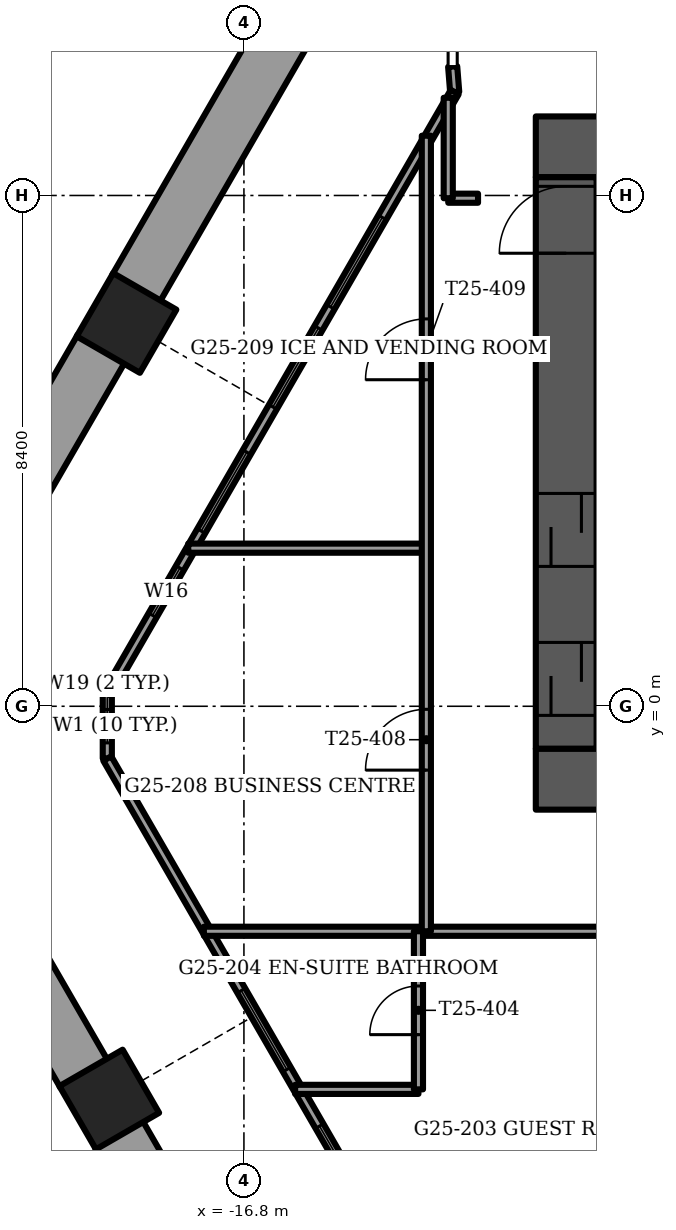
"""IFC4 building model, lengths in metres.
Left out: names, types, materials, properties, quantities, classifications, styles, units other than length and angle.
Written with IfcOpenShell. Run it as: python <this file> out.ifc"""

import sys

from ifc_helpers import new_model, si_unit, direction, frame, frame_2d, origin, origin_2d, place, context, subcontext, project, spatial, rectangle, extrude, element, fill, save


model = new_model("IFC4")
c1 = context("Model", 3, precision=1e-05, world=origin(), true_north=direction((0.0, 1.0)))
c2 = subcontext(c1, "Body", "Model", "MODEL_VIEW")
j1 = project(units=[si_unit("LENGTHUNIT", "METRE"), si_unit("PLANEANGLEUNIT", "RADIAN")], contexts=[c1])
p1 = place(None, origin())
s1 = spatial("IfcSite", under=j1, at=p1, CompositionType="ELEMENT")
p2 = place(p1, origin())
s2 = spatial("IfcBuilding", under=s1, at=p2, CompositionType="ELEMENT")
p3 = place(p2, frame((0.0, 0.0, 100.5)))
s3 = spatial("IfcBuildingStorey", under=s2, at=p3, CompositionType="ELEMENT", Elevation=100.5)
for number, where, z_axis, x_axis in (
    (1, (-18.731, 6.303, -1.2), (0.0, 0.0, 1.0), (0.5, 0.866, 0.0)),
    (2, (-19.014, -6.467, -1.2), (0.0, 0.0, 1.0), (-0.5, 0.866, 0.0)),
):
    element("IfcColumn", number, at=place(p3, frame(where, z_axis=z_axis, x_axis=x_axis)), inside=s3, PredefinedType="COLUMN", context=c2, shape_type="SweptSolid", body=[
        extrude(rectangle(XDim=1.2, YDim=1.2, at=origin_2d()), origin(), (0.0, 0.0, 1.0), 3.75),
    ])
p4 = place(p3, frame((-12.0, -1.2, -0.3), z_axis=(0.0, 0.0, 1.0), x_axis=(1.0, 0.0, 0.0)))
e3 = element("IfcWall", 3, at=p4, inside=s3, PredefinedType="SHEAR", context=c2, shape_type="SweptSolid", body=[
    extrude(rectangle(XDim=24.0, YDim=1.0, at=frame_2d((12.0, 0.0))), origin(), (0.0, 0.0, 1.0), 3.75),
])
p5 = place(p4, frame((11.2, 0.0, 0.0)))
e4 = element("IfcOpeningElement", 4, at=p5, cuts=e3, PredefinedType="OPENING", context=c2, shape_type="SweptSolid", body=[
    extrude(rectangle(XDim=1.6, YDim=2.1, at=frame_2d((0.8, 1.05))), frame((0.0, 0.5, 0.0), z_axis=(0.0, -1.0, 0.0), x_axis=(1.0, 0.0, 0.0)), (0.0, 0.0, 1.0), 1.0),
])
p6 = place(p3, frame((-12.0, 9.2, -0.3), z_axis=(0.0, 0.0, 1.0), x_axis=(1.0, 0.0, 0.0)))
e5 = element("IfcWall", 5, at=p6, inside=s3, PredefinedType="SHEAR", context=c2, shape_type="SweptSolid", body=[
    extrude(rectangle(XDim=24.0, YDim=1.0, at=frame_2d((12.0, 0.0))), origin(), (0.0, 0.0, 1.0), 3.75),
])
p7 = place(p6, frame((11.2, 0.0, 0.0)))
e6 = element("IfcOpeningElement", 6, at=p7, cuts=e5, PredefinedType="OPENING", context=c2, shape_type="SweptSolid", body=[
    extrude(rectangle(XDim=1.6, YDim=2.1, at=frame_2d((0.8, 1.05))), frame((0.0, 0.5, 0.0), z_axis=(0.0, -1.0, 0.0), x_axis=(1.0, 0.0, 0.0)), (0.0, 0.0, 1.0), 1.0),
])
p8 = place(p6, frame((5.25, 0.0, 0.0)))
e7 = element("IfcOpeningElement", 7, at=p8, cuts=e5, PredefinedType="OPENING", context=c2, shape_type="SweptSolid", body=[
    extrude(rectangle(XDim=1.1, YDim=2.1, at=frame_2d((0.55, 1.05))), frame((0.0, 0.5, 0.0), z_axis=(0.0, -1.0, 0.0), x_axis=(1.0, 0.0, 0.0)), (0.0, 0.0, 1.0), 1.0),
])
p9 = place(p6, frame((17.65, 0.0, 0.0)))
e8 = element("IfcOpeningElement", 8, at=p9, cuts=e5, PredefinedType="OPENING", context=c2, shape_type="SweptSolid", body=[
    extrude(rectangle(XDim=1.1, YDim=2.1, at=frame_2d((0.55, 1.05))), frame((0.0, 0.5, 0.0), z_axis=(0.0, -1.0, 0.0), x_axis=(1.0, 0.0, 0.0)), (0.0, 0.0, 1.0), 1.0),
])
p10 = place(p3, frame((-11.5, -0.7, -0.3), z_axis=(0.0, 0.0, 1.0), x_axis=(0.0, 1.0, 0.0)))
e9 = element("IfcWall", 9, at=p10, inside=s3, PredefinedType="SHEAR", context=c2, shape_type="SweptSolid", body=[
    extrude(rectangle(XDim=9.4, YDim=1.0, at=frame_2d((4.7, 0.0))), origin(), (0.0, 0.0, 1.0), 3.75),
])
p11 = place(p10, frame((8.15, 0.0, 0.0)))
e10 = element("IfcOpeningElement", 10, at=p11, cuts=e9, PredefinedType="OPENING", context=c2, shape_type="SweptSolid", body=[
    extrude(rectangle(XDim=1.1, YDim=2.1, at=frame_2d((0.55, 1.05))), frame((0.0, 0.5, 0.0), z_axis=(0.0, -1.0, 0.0), x_axis=(1.0, 0.0, 0.0)), (0.0, 0.0, 1.0), 1.0),
])
p12 = place(p10, frame((0.55, 0.0, 0.0)))
e11 = element("IfcOpeningElement", 11, at=p12, cuts=e9, PredefinedType="OPENING", context=c2, shape_type="SweptSolid", body=[
    extrude(rectangle(XDim=1.2, YDim=2.1, at=frame_2d((0.6, 1.05))), frame((0.0, 0.5, 0.0), z_axis=(0.0, -1.0, 0.0), x_axis=(1.0, 0.0, 0.0)), (0.0, 0.0, 1.0), 1.0),
])
p13 = place(p10, frame((3.0, 0.0, 0.0)))
e12 = element("IfcOpeningElement", 12, at=p13, cuts=e9, PredefinedType="OPENING", context=c2, shape_type="SweptSolid", body=[
    extrude(rectangle(XDim=1.2, YDim=2.1, at=frame_2d((0.6, 1.05))), frame((0.0, 0.5, 0.0), z_axis=(0.0, -1.0, 0.0), x_axis=(1.0, 0.0, 0.0)), (0.0, 0.0, 1.0), 1.0),
])
p14 = place(p3, frame((-15.239, 12.651, 0.0), z_axis=(0.0, 0.0, 1.0), x_axis=(-0.499999023957, -0.866025967302, 0.0)))
e13 = element("IfcWall", 13, at=p14, inside=s3, PredefinedType="PARAPET", context=c2, shape_type="SweptSolid", body=[
    extrude(rectangle(XDim=6.673, YDim=0.9, at=frame_2d((3.337, 0.0))), origin(), (0.0, 0.0, 1.0), 1.1),
])
p15 = place(p3, frame((-19.146, 5.885, 0.0), z_axis=(0.0, 0.0, 1.0), x_axis=(-0.500000042739, -0.866025379109, 0.0)))
e14 = element("IfcWall", 14, at=p15, inside=s3, PredefinedType="PARAPET", context=c2, shape_type="SweptSolid", body=[
    extrude(rectangle(XDim=6.522, YDim=0.9, at=frame_2d((3.261, 0.0))), origin(), (0.0, 0.0, 1.0), 1.1),
])
p16 = place(p3, frame((-22.406, -0.891, 0.0), z_axis=(0.0, 0.0, 1.0), x_axis=(0.500001626982, -0.866024464444, 0.0)))
e15 = element("IfcWall", 15, at=p16, inside=s3, PredefinedType="PARAPET", context=c2, shape_type="SweptSolid", body=[
    extrude(rectangle(XDim=5.955, YDim=0.9, at=frame_2d((2.978, 0.0))), origin(), (0.0, 0.0, 1.0), 1.1),
])
p17 = place(p3, frame((-18.859, -7.035, 0.0), z_axis=(0.0, 0.0, 1.0), x_axis=(0.499999023957, -0.866025967302, 0.0)))
e16 = element("IfcWall", 16, at=p17, inside=s3, PredefinedType="PARAPET", context=c2, shape_type="SweptSolid", body=[
    extrude(rectangle(XDim=6.673, YDim=0.9, at=frame_2d((3.337, 0.0))), origin(), (0.0, 0.0, 1.0), 1.1),
])
p18 = place(p3, frame((-13.334, 10.1, 0.0), z_axis=(0.0, 0.0, 1.0), x_axis=(-0.499990645009, -0.866030804823, 0.0)))
e17 = element("IfcWall", 17, at=p18, inside=s3, PredefinedType="SOLIDWALL", context=c2, shape_type="SweptSolid", body=[
    extrude(rectangle(XDim=11.426, YDim=0.15, at=frame_2d((5.713, 0.0))), origin(), (0.0, 0.0, 1.0), 3.45),
])
p19 = place(p18, frame((2.38, 0.0, 0.15)))
e18 = element("IfcOpeningElement", 18, at=p19, cuts=e17, PredefinedType="OPENING", context=c2, shape_type="SweptSolid", body=[
    extrude(rectangle(XDim=1.7, YDim=2.2, at=frame_2d((0.85, 1.1))), frame((0.0, 0.075, 0.0), z_axis=(0.0, -1.0, 0.0), x_axis=(1.0, 0.0, 0.0)), (0.0, 0.0, 1.0), 0.15),
])
p20 = place(p18, frame((4.48, 0.0, 0.15)))
e19 = element("IfcOpeningElement", 19, at=p20, cuts=e17, PredefinedType="OPENING", context=c2, shape_type="SweptSolid", body=[
    extrude(rectangle(XDim=1.5, YDim=2.2, at=frame_2d((0.75, 1.1))), frame((0.0, 0.075, 0.0), z_axis=(0.0, -1.0, 0.0), x_axis=(1.0, 0.0, 0.0)), (0.0, 0.0, 1.0), 0.15),
])
p21 = place(p18, frame((9.037, 0.0, 0.15)))
e20 = element("IfcOpeningElement", 20, at=p21, cuts=e17, PredefinedType="OPENING", context=c2, shape_type="SweptSolid", body=[
    extrude(rectangle(XDim=0.9, YDim=2.2, at=frame_2d((0.45, 1.1))), frame((0.0, 0.075, 0.0), z_axis=(0.0, -1.0, 0.0), x_axis=(1.0, 0.0, 0.0)), (0.0, 0.0, 1.0), 0.15),
])
p22 = place(p18, frame((6.836, 0.0, 0.15)))
e21 = element("IfcOpeningElement", 21, at=p22, cuts=e17, PredefinedType="OPENING", context=c2, shape_type="SweptSolid", body=[
    extrude(rectangle(XDim=1.5, YDim=2.2, at=frame_2d((0.75, 1.1))), frame((0.0, 0.075, 0.0), z_axis=(0.0, -1.0, 0.0), x_axis=(1.0, 0.0, 0.0)), (0.0, 0.0, 1.0), 0.15),
])
p23 = place(p3, frame((-19.047, -0.86, 0.0), z_axis=(0.0, 0.0, 1.0), x_axis=(0.499999897272, -0.866025463095, 0.0)))
e22 = element("IfcWall", 22, at=p23, inside=s3, PredefinedType="SOLIDWALL", context=c2, shape_type="SweptSolid", body=[
    extrude(rectangle(XDim=11.426, YDim=0.15, at=frame_2d((5.713, 0.0))), origin(), (0.0, 0.0, 1.0), 3.45),
])
p24 = place(p23, frame((4.406, 0.0, 0.15)))
e23 = element("IfcOpeningElement", 23, at=p24, cuts=e22, PredefinedType="OPENING", context=c2, shape_type="SweptSolid", body=[
    extrude(rectangle(XDim=1.5, YDim=2.2, at=frame_2d((0.75, 1.1))), frame((0.0, 0.075, 0.0), z_axis=(0.0, -1.0, 0.0), x_axis=(1.0, 0.0, 0.0)), (0.0, 0.0, 1.0), 0.15),
])
p25 = place(p23, frame((6.979, 0.0, 0.15)))
e24 = element("IfcOpeningElement", 24, at=p25, cuts=e22, PredefinedType="OPENING", context=c2, shape_type="SweptSolid", body=[
    extrude(rectangle(XDim=1.7, YDim=2.2, at=frame_2d((0.85, 1.1))), frame((0.0, 0.075, 0.0), z_axis=(0.0, -1.0, 0.0), x_axis=(1.0, 0.0, 0.0)), (0.0, 0.0, 1.0), 0.15),
])
p26 = place(p3, frame((-19.047, 0.205, 0.0), z_axis=(0.0, 0.0, 1.0), x_axis=(0.0, -1.0, 0.0)))
e25 = element("IfcWall", 25, at=p26, inside=s3, PredefinedType="SOLIDWALL", context=c2, shape_type="SweptSolid", body=[
    extrude(rectangle(XDim=1.065, YDim=0.15, at=frame_2d((0.532, 0.0))), origin(), (0.0, 0.0, 1.0), 3.45),
])
p27 = place(p26, frame((0.258, 0.0, 0.15)))
e26 = element("IfcOpeningElement", 26, at=p27, cuts=e25, PredefinedType="OPENING", context=c2, shape_type="SweptSolid", body=[
    extrude(rectangle(XDim=0.55, YDim=2.2, at=frame_2d((0.275, 1.1))), frame((0.0, 0.075, 0.0), z_axis=(0.0, -1.0, 0.0), x_axis=(1.0, 0.0, 0.0)), (0.0, 0.0, 1.0), 0.15),
])
p28 = place(p3, frame((-13.334, 10.1, 0.0), z_axis=(0.0, 0.0, 1.0), x_axis=(-0.078869316502, 0.996884963732, 0.0)))
e27 = element("IfcWall", 27, at=p28, inside=s3, PredefinedType="SOLIDWALL", context=c2, shape_type="SweptSolid", body=[
    extrude(rectangle(XDim=0.421, YDim=0.15, at=frame_2d((0.21, 0.0))), origin(), (0.0, 0.0, 1.0), 3.45),
])
p29 = place(p3, frame((-15.958, -6.3, 0.0), z_axis=(0.0, 0.0, 1.0), x_axis=(1.0, 0.0, 0.0)))
e28 = element("IfcWall", 28, at=p29, inside=s3, PredefinedType="PARTITIONING", context=c2, shape_type="SweptSolid", body=[
    extrude(rectangle(XDim=2.028, YDim=0.15, at=frame_2d((1.014, 0.0))), origin(), (0.0, 0.0, 1.0), 3.45),
])
p30 = place(p3, frame((-17.459, -3.7, 0.0), z_axis=(0.0, 0.0, 1.0), x_axis=(1.0, 0.0, 0.0)))
e29 = element("IfcWall", 29, at=p30, inside=s3, PredefinedType="PARTITIONING", context=c2, shape_type="SweptSolid", body=[
    extrude(rectangle(XDim=8.299, YDim=0.15, at=frame_2d((4.149, 0.0))), origin(), (0.0, 0.0, 1.0), 3.45),
])
p31 = place(p30, frame((7.059, 0.0, 0.0)))
e30 = element("IfcOpeningElement", 30, at=p31, cuts=e29, PredefinedType="OPENING", context=c2, shape_type="SweptSolid", body=[
    extrude(rectangle(XDim=1.0, YDim=2.1, at=frame_2d((0.5, 1.05))), frame((0.0, 0.075, 0.0), z_axis=(0.0, -1.0, 0.0), x_axis=(1.0, 0.0, 0.0)), (0.0, 0.0, 1.0), 0.15),
])
p32 = place(p3, frame((-17.716, 2.6, 0.0), z_axis=(0.0, 0.0, 1.0), x_axis=(1.0, 0.0, 0.0)))
e31 = element("IfcWall", 31, at=p32, inside=s3, PredefinedType="PARTITIONING", context=c2, shape_type="SweptSolid", body=[
    extrude(rectangle(XDim=3.916, YDim=0.15, at=frame_2d((1.958, 0.0))), origin(), (0.0, 0.0, 1.0), 3.45),
])
p33 = place(p3, frame((-13.44, 8.355, 0.0), z_axis=(0.0, 0.0, 1.0), x_axis=(1.0, 0.0, 0.0)))
e32 = element("IfcWall", 32, at=p33, inside=s3, PredefinedType="PARTITIONING", context=c2, shape_type="SweptSolid", body=[
    extrude(rectangle(XDim=0.49, YDim=0.15, at=frame_2d((0.245, 0.0))), origin(), (0.0, 0.0, 1.0), 3.45),
])
p34 = place(p3, frame((-13.44, 8.355, 0.0), z_axis=(0.0, 0.0, 1.0), x_axis=(0.0, 1.0, 0.0)))
e33 = element("IfcWall", 33, at=p34, inside=s3, PredefinedType="PARTITIONING", context=c2, shape_type="SweptSolid", body=[
    extrude(rectangle(XDim=1.652, YDim=0.15, at=frame_2d((0.826, 0.0))), origin(), (0.0, 0.0, 1.0), 3.45),
])
p35 = place(p3, frame((-13.8, -3.7, 0.0), z_axis=(0.0, 0.0, 1.0), x_axis=(0.0, 1.0, 0.0)))
e34 = element("IfcWall", 34, at=p35, inside=s3, PredefinedType="PARTITIONING", context=c2, shape_type="SweptSolid", body=[
    extrude(rectangle(XDim=13.083, YDim=0.15, at=frame_2d((6.542, 0.0))), origin(), (0.0, 0.0, 1.0), 3.45),
])
p36 = place(p35, frame((2.65, 0.0, 0.0)))
e35 = element("IfcOpeningElement", 35, at=p36, cuts=e34, PredefinedType="OPENING", context=c2, shape_type="SweptSolid", body=[
    extrude(rectangle(XDim=1.0, YDim=2.1, at=frame_2d((0.5, 1.05))), frame((0.0, 0.075, 0.0), z_axis=(0.0, -1.0, 0.0), x_axis=(1.0, 0.0, 0.0)), (0.0, 0.0, 1.0), 0.15),
])
p37 = place(p35, frame((9.07, 0.0, 0.0)))
e36 = element("IfcOpeningElement", 36, at=p37, cuts=e34, PredefinedType="OPENING", context=c2, shape_type="SweptSolid", body=[
    extrude(rectangle(XDim=1.0, YDim=2.1, at=frame_2d((0.5, 1.05))), frame((0.0, 0.075, 0.0), z_axis=(0.0, -1.0, 0.0), x_axis=(1.0, 0.0, 0.0)), (0.0, 0.0, 1.0), 0.15),
])
p38 = place(p3, frame((-13.93, -6.3, 0.0), z_axis=(0.0, 0.0, 1.0), x_axis=(0.0, 1.0, 0.0)))
e37 = element("IfcWall", 37, at=p38, inside=s3, PredefinedType="PARTITIONING", context=c2, shape_type="SweptSolid", body=[
    extrude(rectangle(XDim=2.6, YDim=0.15, at=frame_2d((1.3, 0.0))), origin(), (0.0, 0.0, 1.0), 3.45),
])
p39 = place(p38, frame((0.9, 0.0, 0.0)))
e38 = element("IfcOpeningElement", 38, at=p39, cuts=e37, PredefinedType="OPENING", context=c2, shape_type="SweptSolid", body=[
    extrude(rectangle(XDim=0.8, YDim=2.1, at=frame_2d((0.4, 1.05))), frame((0.0, 0.075, 0.0), z_axis=(0.0, -1.0, 0.0), x_axis=(1.0, 0.0, 0.0)), (0.0, 0.0, 1.0), 0.15),
])
p40 = place(p19, origin())
e39 = element("IfcWindow", 39, at=p40, inside=s3, PartitioningType="SINGLE_PANEL", PredefinedType="WINDOW", context=c2, shape_type="SweptSolid", body=[
    extrude(rectangle(XDim=1.7, YDim=2.2, at=frame_2d((0.85, 1.1))), frame((0.0, 0.03, 0.0), z_axis=(0.0, -1.0, 0.0), x_axis=(1.0, 0.0, 0.0)), (0.0, 0.0, 1.0), 0.06),
])
fill(e18, e39)
p41 = place(p20, origin())
e40 = element("IfcWindow", 40, at=p41, inside=s3, PartitioningType="SINGLE_PANEL", PredefinedType="WINDOW", context=c2, shape_type="SweptSolid", body=[
    extrude(rectangle(XDim=1.5, YDim=2.2, at=frame_2d((0.75, 1.1))), frame((0.0, 0.03, 0.0), z_axis=(0.0, -1.0, 0.0), x_axis=(1.0, 0.0, 0.0)), (0.0, 0.0, 1.0), 0.06),
])
fill(e19, e40)
p42 = place(p21, origin())
e41 = element("IfcWindow", 41, at=p42, inside=s3, PartitioningType="SINGLE_PANEL", PredefinedType="WINDOW", context=c2, shape_type="SweptSolid", body=[
    extrude(rectangle(XDim=0.9, YDim=2.2, at=frame_2d((0.45, 1.1))), frame((0.0, 0.03, 0.0), z_axis=(0.0, -1.0, 0.0), x_axis=(1.0, 0.0, 0.0)), (0.0, 0.0, 1.0), 0.06),
])
fill(e20, e41)
p43 = place(p22, origin())
e42 = element("IfcWindow", 42, at=p43, inside=s3, PartitioningType="SINGLE_PANEL", PredefinedType="WINDOW", context=c2, shape_type="SweptSolid", body=[
    extrude(rectangle(XDim=1.5, YDim=2.2, at=frame_2d((0.75, 1.1))), frame((0.0, 0.03, 0.0), z_axis=(0.0, -1.0, 0.0), x_axis=(1.0, 0.0, 0.0)), (0.0, 0.0, 1.0), 0.06),
])
fill(e21, e42)
p44 = place(p24, origin())
e43 = element("IfcWindow", 43, at=p44, inside=s3, PartitioningType="SINGLE_PANEL", PredefinedType="WINDOW", context=c2, shape_type="SweptSolid", body=[
    extrude(rectangle(XDim=1.5, YDim=2.2, at=frame_2d((0.75, 1.1))), frame((0.0, 0.03, 0.0), z_axis=(0.0, -1.0, 0.0), x_axis=(1.0, 0.0, 0.0)), (0.0, 0.0, 1.0), 0.06),
])
fill(e23, e43)
p45 = place(p25, origin())
e44 = element("IfcWindow", 44, at=p45, inside=s3, PartitioningType="SINGLE_PANEL", PredefinedType="WINDOW", context=c2, shape_type="SweptSolid", body=[
    extrude(rectangle(XDim=1.7, YDim=2.2, at=frame_2d((0.85, 1.1))), frame((0.0, 0.03, 0.0), z_axis=(0.0, -1.0, 0.0), x_axis=(1.0, 0.0, 0.0)), (0.0, 0.0, 1.0), 0.06),
])
fill(e24, e44)
p46 = place(p27, origin())
e45 = element("IfcWindow", 45, at=p46, inside=s3, PartitioningType="SINGLE_PANEL", PredefinedType="WINDOW", context=c2, shape_type="SweptSolid", body=[
    extrude(rectangle(XDim=0.55, YDim=2.2, at=frame_2d((0.275, 1.1))), frame((0.0, 0.03, 0.0), z_axis=(0.0, -1.0, 0.0), x_axis=(1.0, 0.0, 0.0)), (0.0, 0.0, 1.0), 0.06),
])
fill(e26, e45)
p47 = place(p11, origin())
e46 = element("IfcDoor", 46, at=p47, inside=s3, OperationType="SINGLE_SWING_LEFT", PredefinedType="DOOR", context=c2, shape_type="SweptSolid", body=[
    extrude(rectangle(XDim=1.1, YDim=2.1, at=frame_2d((0.55, 1.05))), frame((0.0, 0.025, 0.0), z_axis=(0.0, -1.0, 0.0), x_axis=(1.0, 0.0, 0.0)), (0.0, 0.0, 1.0), 0.05),
])
fill(e10, e46)
p48 = place(p12, origin())
e47 = element("IfcDoor", 47, at=p48, inside=s3, OperationType="SLIDING_TO_LEFT", PredefinedType="DOOR", context=c2, shape_type="SweptSolid", body=[
    extrude(rectangle(XDim=1.2, YDim=2.1, at=frame_2d((0.6, 1.05))), frame((0.0, 0.025, 0.0), z_axis=(0.0, -1.0, 0.0), x_axis=(1.0, 0.0, 0.0)), (0.0, 0.0, 1.0), 0.05),
])
fill(e11, e47)
p49 = place(p13, origin())
e48 = element("IfcDoor", 48, at=p49, inside=s3, OperationType="SLIDING_TO_LEFT", PredefinedType="DOOR", context=c2, shape_type="SweptSolid", body=[
    extrude(rectangle(XDim=1.2, YDim=2.1, at=frame_2d((0.6, 1.05))), frame((0.0, 0.025, 0.0), z_axis=(0.0, -1.0, 0.0), x_axis=(1.0, 0.0, 0.0)), (0.0, 0.0, 1.0), 0.05),
])
fill(e12, e48)
p50 = place(p39, origin())
e49 = element("IfcDoor", 49, at=p50, inside=s3, OperationType="SINGLE_SWING_RIGHT", PredefinedType="DOOR", context=c2, shape_type="SweptSolid", body=[
    extrude(rectangle(XDim=0.8, YDim=2.1, at=frame_2d((0.4, 1.05))), frame((0.0, 0.025, 0.0), z_axis=(0.0, -1.0, 0.0), x_axis=(1.0, 0.0, 0.0)), (0.0, 0.0, 1.0), 0.05),
])
fill(e38, e49)
p51 = place(p36, origin())
e50 = element("IfcDoor", 50, at=p51, inside=s3, OperationType="SINGLE_SWING_RIGHT", PredefinedType="DOOR", context=c2, shape_type="SweptSolid", body=[
    extrude(rectangle(XDim=1.0, YDim=2.1, at=frame_2d((0.5, 1.05))), frame((0.0, 0.025, 0.0), z_axis=(0.0, -1.0, 0.0), x_axis=(1.0, 0.0, 0.0)), (0.0, 0.0, 1.0), 0.05),
])
fill(e35, e50)
p52 = place(p37, origin())
e51 = element("IfcDoor", 51, at=p52, inside=s3, OperationType="SINGLE_SWING_LEFT", PredefinedType="DOOR", context=c2, shape_type="SweptSolid", body=[
    extrude(rectangle(XDim=1.0, YDim=2.1, at=frame_2d((0.5, 1.05))), frame((0.0, 0.025, 0.0), z_axis=(0.0, -1.0, 0.0), x_axis=(1.0, 0.0, 0.0)), (0.0, 0.0, 1.0), 0.05),
])
fill(e36, e51)
save(model, sys.argv[1])
